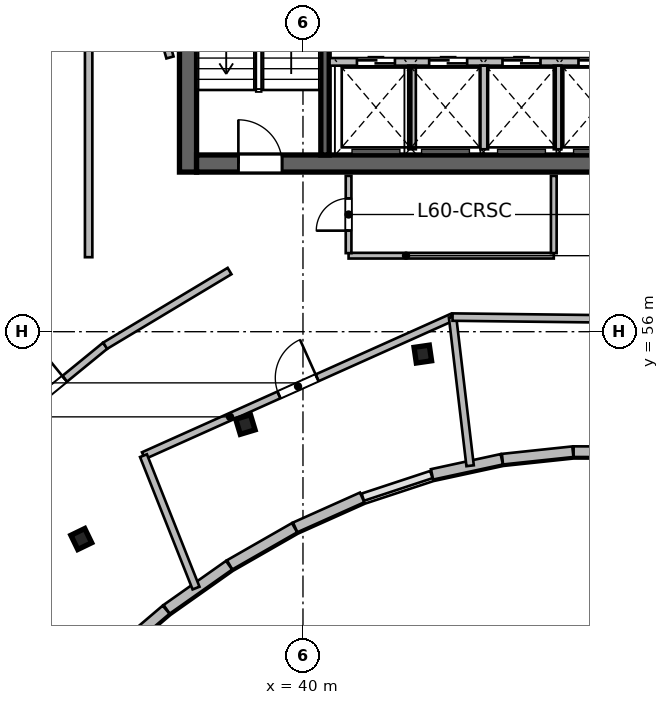
"""IFC4 building model, lengths in metres.
Left out: names, types, materials, properties, quantities, classifications, styles, units other than length and angle.
Written with IfcOpenShell. Run it as: python <this file> out.ifc"""

import sys

from ifc_helpers import new_model, si_unit, direction, frame, frame_2d, origin, origin_2d, place, context, subcontext, project, spatial, rectangle, i_section, extrude, source, transform, mapped, element, fill, save


model = new_model("IFC4")
c1 = context("Model", 3, precision=1e-05, world=origin(), true_north=direction((0.0, 1.0)))
c2 = subcontext(c1, "Body", "Model", "MODEL_VIEW")
j1 = project(units=[si_unit("LENGTHUNIT", "METRE"), si_unit("PLANEANGLEUNIT", "RADIAN")], contexts=[c1])
p1 = place(None, origin())
s1 = spatial("IfcSite", under=j1, at=p1, CompositionType="ELEMENT")
p2 = place(p1, origin())
s2 = spatial("IfcBuilding", under=s1, at=p2, CompositionType="ELEMENT")
p3 = place(p2, frame((0.0, 0.0, 246.9)))
s3 = spatial("IfcBuildingStorey", under=s2, at=p3, CompositionType="ELEMENT", Elevation=246.9)
m1 = source(origin(), c2, "Body", "SweptSolid", [
    extrude(rectangle(XDim=12.0, YDim=0.45, at=frame_2d((6.0, 0.0))), origin(), (0.0, 0.0, 1.0), 3.9),
])
p4 = place(p3, frame((36.975, 60.2, 0.0), z_axis=(0.0, 0.0, 1.0), x_axis=(0.0, 1.0, 0.0)))
e1 = element("IfcWall", 1, at=p4, inside=s3, PredefinedType="SHEAR", context=c2, shape_type="MappedRepresentation", body=[
    mapped(m1, transform((0.0, 0.0, 0.0), scale=1.0)),
])
m2 = source(origin(), c2, "Body", "SweptSolid", [
    extrude(rectangle(XDim=21.6, YDim=0.45, at=frame_2d((10.8, 0.0))), origin(), (0.0, 0.0, 1.0), 3.9),
])
p5 = place(p3, frame((37.2, 60.425, 0.0), z_axis=(0.0, 0.0, 1.0), x_axis=(1.0, 0.0, 0.0)))
e2 = element("IfcWall", 2, at=p5, inside=s3, PredefinedType="SHEAR", context=c2, shape_type="MappedRepresentation", body=[
    mapped(m2, transform((0.0, 0.0, 0.0), scale=1.0)),
])
p6 = place(p5, frame((1.1, 0.0, 0.0)))
e3 = element("IfcOpeningElement", 3, at=p6, cuts=e2, PredefinedType="OPENING", context=c2, shape_type="SweptSolid", body=[
    extrude(rectangle(XDim=1.15, YDim=2.15, at=frame_2d((0.575, 1.075))), frame((0.0, 0.235, 0.0), z_axis=(0.0, -1.0, 0.0), x_axis=(1.0, 0.0, 0.0)), (0.0, 0.0, 1.0), 0.47),
])
p7 = place(p5, frame((19.5, 0.0, 0.0)))
e4 = element("IfcOpeningElement", 4, at=p7, cuts=e2, PredefinedType="OPENING", context=c2, shape_type="SweptSolid", body=[
    extrude(rectangle(XDim=0.9, YDim=2.1, at=frame_2d((0.45, 1.05))), frame((0.0, 0.235, 0.0), z_axis=(0.0, -1.0, 0.0), x_axis=(1.0, 0.0, 0.0)), (0.0, 0.0, 1.0), 0.47),
])
p8 = place(p5, frame((12.02, 0.0, 0.0)))
e5 = element("IfcOpeningElement", 5, at=p8, cuts=e2, PredefinedType="OPENING", context=c2, shape_type="SweptSolid", body=[
    extrude(rectangle(XDim=1.6, YDim=2.15, at=frame_2d((0.8, 1.075))), frame((0.0, 0.235, 0.0), z_axis=(0.0, -1.0, 0.0), x_axis=(1.0, 0.0, 0.0)), (0.0, 0.0, 1.0), 0.47),
])
m3 = source(origin(), c2, "Body", "SweptSolid", [
    extrude(rectangle(XDim=11.1, YDim=0.22, at=frame_2d((5.55, 0.0))), origin(), (0.0, 0.0, 1.0), 3.9),
])
p9 = place(p3, frame((40.58, 60.65, 0.0), z_axis=(0.0, 0.0, 1.0), x_axis=(0.0, 1.0, 0.0)))
e6 = element("IfcWall", 6, at=p9, inside=s3, PredefinedType="SHEAR", context=c2, shape_type="MappedRepresentation", body=[
    mapped(m3, transform((0.0, 0.0, 0.0), scale=1.0)),
])
m4 = source(origin(), c2, "Body", "SweptSolid", [
    extrude(i_section(OverallWidth=0.406, OverallDepth=0.416, WebThickness=0.03, FlangeThickness=0.048, at=origin_2d()), origin(), (0.0, 0.0, 1.0), 3.9),
])
for number, where, z_axis, x_axis in (
    (7, (34.166, 50.545, 0.0), (0.0, 0.0, 1.0), (-0.436, 0.9, 0.0)),
    (8, (38.485, 53.558, 0.0), (0.0, 0.0, 1.0), (-0.289, 0.957, 0.0)),
    (9, (43.154, 55.411, 0.0), (0.0, 0.0, 1.0), (-0.143, 0.99, 0.0)),
):
    element("IfcColumn", number, at=place(p3, frame(where, z_axis=z_axis, x_axis=x_axis)), inside=s3, PredefinedType="COLUMN", context=c2, shape_type="MappedRepresentation", body=[
        mapped(m4, transform((0.0, 0.0, 0.0), scale=1.0)),
    ])
m5 = source(origin(), c2, "Body", "SweptSolid", [
    extrude(rectangle(XDim=1.858, YDim=0.28, at=frame_2d((0.929, 0.0))), origin(), (0.0, 0.0, 1.0), 3.65),
])
p10 = place(p3, frame((48.979, 52.838, 0.0), z_axis=(0.0, 0.0, 1.0), x_axis=(-0.999995433965, 0.003021928128, 0.0)))
e10 = element("IfcWall", 10, at=p10, inside=s3, PredefinedType="SOLIDWALL", context=c2, shape_type="MappedRepresentation", body=[
    mapped(m5, transform((0.0, 0.0, 0.0), scale=1.0)),
])
m6 = source(origin(), c2, "Body", "SweptSolid", [
    extrude(rectangle(XDim=1.862, YDim=0.28, at=frame_2d((0.931, 0.0))), origin(), (0.0, 0.0, 1.0), 3.65),
])
p11 = place(p3, frame((47.102, 52.842, 0.0), z_axis=(0.0, 0.0, 1.0), x_axis=(-0.994430497743, -0.1053944266, 0.0)))
e11 = element("IfcWall", 11, at=p11, inside=s3, PredefinedType="SOLIDWALL", context=c2, shape_type="MappedRepresentation", body=[
    mapped(m6, transform((0.0, 0.0, 0.0), scale=1.0)),
])
m7 = source(origin(), c2, "Body", "SweptSolid", [
    extrude(rectangle(XDim=1.877, YDim=0.28, at=frame_2d((0.938, 0.0))), origin(), (0.0, 0.0, 1.0), 3.65),
])
p12 = place(p3, frame((45.231, 52.643, 0.0), z_axis=(0.0, 0.0, 1.0), x_axis=(-0.97737202312, -0.211527606761, 0.0)))
e12 = element("IfcWall", 12, at=p12, inside=s3, PredefinedType="SOLIDWALL", context=c2, shape_type="MappedRepresentation", body=[
    mapped(m7, transform((0.0, 0.0, 0.0), scale=1.0)),
])
m8 = source(origin(), c2, "Body", "SweptSolid", [
    extrude(rectangle(XDim=1.931, YDim=0.28, at=frame_2d((0.965, 0.0))), origin(), (0.0, 0.0, 1.0), 3.65),
])
p13 = place(p3, frame((41.557, 51.639, 0.0), z_axis=(0.0, 0.0, 1.0), x_axis=(-0.912681759743, -0.408671023481, 0.0)))
e13 = element("IfcWall", 13, at=p13, inside=s3, PredefinedType="SOLIDWALL", context=c2, shape_type="MappedRepresentation", body=[
    mapped(m8, transform((0.0, 0.0, 0.0), scale=1.0)),
])
m9 = source(origin(), c2, "Body", "SweptSolid", [
    extrude(rectangle(XDim=1.969, YDim=0.28, at=frame_2d((0.984, 0.0))), origin(), (0.0, 0.0, 1.0), 3.65),
])
p14 = place(p3, frame((39.779, 50.842, 0.0), z_axis=(0.0, 0.0, 1.0), x_axis=(-0.86797594681, -0.496606238139, 0.0)))
e14 = element("IfcWall", 14, at=p14, inside=s3, PredefinedType="SOLIDWALL", context=c2, shape_type="MappedRepresentation", body=[
    mapped(m9, transform((0.0, 0.0, 0.0), scale=1.0)),
])
m10 = source(origin(), c2, "Body", "SweptSolid", [
    extrude(rectangle(XDim=2.012, YDim=0.28, at=frame_2d((1.006, 0.0))), origin(), (0.0, 0.0, 1.0), 3.65),
])
p15 = place(p3, frame((38.055, 49.855, 0.0), z_axis=(0.0, 0.0, 1.0), x_axis=(-0.817008215805, -0.576626027255, 0.0)))
e15 = element("IfcWall", 15, at=p15, inside=s3, PredefinedType="SOLIDWALL", context=c2, shape_type="MappedRepresentation", body=[
    mapped(m10, transform((0.0, 0.0, 0.0), scale=1.0)),
])
m11 = source(origin(), c2, "Body", "SweptSolid", [
    extrude(rectangle(XDim=2.06, YDim=0.28, at=frame_2d((1.03, 0.0))), origin(), (0.0, 0.0, 1.0), 3.65),
])
p16 = place(p3, frame((36.399, 48.685, 0.0), z_axis=(0.0, 0.0, 1.0), x_axis=(-0.761494573969, -0.648171284319, 0.0)))
e16 = element("IfcWall", 16, at=p16, inside=s3, PredefinedType="SOLIDWALL", context=c2, shape_type="MappedRepresentation", body=[
    mapped(m11, transform((0.0, 0.0, 0.0), scale=1.0)),
])
m12 = source(origin(), c2, "Body", "SweptSolid", [
    extrude(rectangle(XDim=8.02, YDim=0.2, at=frame_2d((4.01, 0.0))), origin(), (0.0, 0.0, 1.0), 3.65),
])
p17 = place(p3, frame((40.7, 63.1, 0.0), z_axis=(0.0, 0.0, 1.0), x_axis=(1.0, 0.0, 0.0)))
e17 = element("IfcWall", 17, at=p17, inside=s3, PredefinedType="SOLIDWALL", context=c2, shape_type="MappedRepresentation", body=[
    mapped(m12, transform((0.0, 0.0, 0.0), scale=1.0)),
])
p18 = place(p17, frame((0.72, 0.0, 0.0)))
e18 = element("IfcOpeningElement", 18, at=p18, cuts=e17, PredefinedType="OPENING", context=c2, shape_type="SweptSolid", body=[
    extrude(rectangle(XDim=1.0, YDim=2.15, at=frame_2d((0.5, 1.075))), frame((0.0, 0.11, 0.0), z_axis=(0.0, -1.0, 0.0), x_axis=(1.0, 0.0, 0.0)), (0.0, 0.0, 1.0), 0.22),
])
p19 = place(p17, frame((2.62, 0.0, 0.0)))
e19 = element("IfcOpeningElement", 19, at=p19, cuts=e17, PredefinedType="OPENING", context=c2, shape_type="SweptSolid", body=[
    extrude(rectangle(XDim=1.0, YDim=2.15, at=frame_2d((0.5, 1.075))), frame((0.0, 0.11, 0.0), z_axis=(0.0, -1.0, 0.0), x_axis=(1.0, 0.0, 0.0)), (0.0, 0.0, 1.0), 0.22),
])
p20 = place(p17, frame((4.55, 0.0, 0.0)))
e20 = element("IfcOpeningElement", 20, at=p20, cuts=e17, PredefinedType="OPENING", context=c2, shape_type="SweptSolid", body=[
    extrude(rectangle(XDim=1.0, YDim=2.15, at=frame_2d((0.5, 1.075))), frame((0.0, 0.11, 0.0), z_axis=(0.0, -1.0, 0.0), x_axis=(1.0, 0.0, 0.0)), (0.0, 0.0, 1.0), 0.22),
])
p21 = place(p17, frame((6.55, 0.0, 0.0)))
e21 = element("IfcOpeningElement", 21, at=p21, cuts=e17, PredefinedType="OPENING", context=c2, shape_type="SweptSolid", body=[
    extrude(rectangle(XDim=1.0, YDim=2.15, at=frame_2d((0.5, 1.075))), frame((0.0, 0.11, 0.0), z_axis=(0.0, -1.0, 0.0), x_axis=(1.0, 0.0, 0.0)), (0.0, 0.0, 1.0), 0.22),
])
m13 = source(origin(), c2, "Body", "SweptSolid", [
    extrude(rectangle(XDim=2.2, YDim=0.2, at=frame_2d((1.1, 0.0))), origin(), (0.0, 0.0, 1.0), 3.65),
])
for number, where, z_axis, x_axis in (
    (22, (42.87, 60.8, 0.0), (0.0, 0.0, 1.0), (0.0, 1.0, 0.0)),
    (23, (44.77, 60.8, 0.0), (0.0, 0.0, 1.0), (0.0, 1.0, 0.0)),
    (24, (46.7, 60.8, 0.0), (0.0, 0.0, 1.0), (0.0, 1.0, 0.0)),
):
    element("IfcWall", number, at=place(p3, frame(where, z_axis=z_axis, x_axis=x_axis)), inside=s3, PredefinedType="SOLIDWALL", context=c2, shape_type="MappedRepresentation", body=[
        mapped(m13, transform((0.0, 0.0, 0.0), scale=1.0)),
    ])
m14 = source(origin(), c2, "Body", "SweptSolid", [
    extrude(rectangle(XDim=5.4, YDim=0.15, at=frame_2d((2.7, 0.0))), origin(), (0.0, 0.0, 1.0), 3.65),
])
p22 = place(p3, frame((41.2, 58.0, 0.0), z_axis=(0.0, 0.0, 1.0), x_axis=(1.0, 0.0, 0.0)))
e25 = element("IfcWall", 25, at=p22, inside=s3, PredefinedType="PARTITIONING", context=c2, shape_type="MappedRepresentation", body=[
    mapped(m14, transform((0.0, 0.0, 0.0), scale=1.0)),
])
m15 = source(origin(), c2, "Body", "SweptSolid", [
    extrude(rectangle(XDim=2.033, YDim=0.15, at=frame_2d((1.016, 0.0))), origin(), (0.0, 0.0, 1.0), 3.65),
])
p23 = place(p3, frame((41.2, 58.067, 0.0), z_axis=(0.0, 0.0, 1.0), x_axis=(0.0, 1.0, 0.0)))
e26 = element("IfcWall", 26, at=p23, inside=s3, PredefinedType="PARTITIONING", context=c2, shape_type="MappedRepresentation", body=[
    mapped(m15, transform((0.0, 0.0, 0.0), scale=1.0)),
])
p24 = place(p23, frame((0.591, 0.0, 0.0)))
e27 = element("IfcOpeningElement", 27, at=p24, cuts=e26, PredefinedType="OPENING", context=c2, shape_type="SweptSolid", body=[
    extrude(rectangle(XDim=0.85, YDim=2.1, at=frame_2d((0.425, 1.05))), frame((0.0, 0.085, 0.0), z_axis=(0.0, -1.0, 0.0), x_axis=(1.0, 0.0, 0.0)), (0.0, 0.0, 1.0), 0.17),
])
p25 = place(p3, frame((46.6, 58.067, 0.0), z_axis=(0.0, 0.0, 1.0), x_axis=(0.0, 1.0, 0.0)))
e28 = element("IfcWall", 28, at=p25, inside=s3, PredefinedType="PARTITIONING", context=c2, shape_type="MappedRepresentation", body=[
    mapped(m15, transform((0.0, 0.0, 0.0), scale=1.0)),
])
m16 = source(origin(), c2, "Body", "SweptSolid", [
    extrude(rectangle(XDim=8.913, YDim=0.195, at=frame_2d((4.457, 0.0))), origin(), (0.0, 0.0, 1.0), 3.65),
])
p26 = place(p3, frame((35.803, 52.738, 0.0), z_axis=(0.0, 0.0, 1.0), x_axis=(0.912488521546, 0.409102307555, 0.0)))
e29 = element("IfcWall", 29, at=p26, inside=s3, PredefinedType="PARTITIONING", context=c2, shape_type="MappedRepresentation", body=[
    mapped(m16, transform((0.0, 0.0, 0.0), scale=1.0)),
])
p27 = place(p26, frame((3.906, 0.0, 0.0)))
e30 = element("IfcOpeningElement", 30, at=p27, cuts=e29, PredefinedType="OPENING", context=c2, shape_type="SweptSolid", body=[
    extrude(rectangle(XDim=1.1, YDim=2.15, at=frame_2d((0.55, 1.075))), frame((0.0, 0.107, 0.0), z_axis=(0.0, -1.0, 0.0), x_axis=(1.0, 0.0, 0.0)), (0.0, 0.0, 1.0), 0.215),
])
m17 = source(origin(), c2, "Body", "SweptSolid", [
    extrude(rectangle(XDim=3.749, YDim=0.195, at=frame_2d((1.875, 0.0))), origin(), (0.0, 0.0, 1.0), 3.65),
])
p28 = place(p3, frame((37.186, 49.254, 0.0), z_axis=(0.0, 0.0, 1.0), x_axis=(-0.368851771682, 0.92948823044, 0.0)))
e31 = element("IfcWall", 31, at=p28, inside=s3, PredefinedType="PARTITIONING", context=c2, shape_type="MappedRepresentation", body=[
    mapped(m17, transform((0.0, 0.0, 0.0), scale=1.0)),
])
m18 = source(origin(), c2, "Body", "SweptSolid", [
    extrude(rectangle(XDim=3.939, YDim=0.195, at=frame_2d((1.969, 0.0))), origin(), (0.0, 0.0, 1.0), 3.65),
])
p29 = place(p3, frame((44.398, 52.473, 0.0), z_axis=(0.0, 0.0, 1.0), x_axis=(-0.117395053494, 0.993085294129, 0.0)))
e32 = element("IfcWall", 32, at=p29, inside=s3, PredefinedType="PARTITIONING", context=c2, shape_type="MappedRepresentation", body=[
    mapped(m18, transform((0.0, 0.0, 0.0), scale=1.0)),
])
m19 = source(origin(), c2, "Body", "SweptSolid", [
    extrude(rectangle(XDim=8.576, YDim=0.195, at=frame_2d((4.288, 0.0))), origin(), (0.0, 0.0, 1.0), 3.65),
])
p30 = place(p3, frame((43.936, 56.385, 0.0), z_axis=(0.0, 0.0, 1.0), x_axis=(0.999931553434, -0.011699933624, 0.0)))
e33 = element("IfcWall", 33, at=p30, inside=s3, PredefinedType="PARTITIONING", context=c2, shape_type="MappedRepresentation", body=[
    mapped(m19, transform((0.0, 0.0, 0.0), scale=1.0)),
])
p31 = place(p30, frame((4.488, 0.0, 0.0)))
e34 = element("IfcOpeningElement", 34, at=p31, cuts=e33, PredefinedType="OPENING", context=c2, shape_type="SweptSolid", body=[
    extrude(rectangle(XDim=1.1, YDim=2.15, at=frame_2d((0.55, 1.075))), frame((0.0, 0.107, 0.0), z_axis=(0.0, -1.0, 0.0), x_axis=(1.0, 0.0, 0.0)), (0.0, 0.0, 1.0), 0.215),
])
m20 = source(origin(), c2, "Body", "SweptSolid", [
    extrude(rectangle(XDim=3.954, YDim=0.195, at=frame_2d((1.977, 0.0))), origin(), (0.0, 0.0, 1.0), 3.65),
])
p32 = place(p3, frame((31.733, 53.13, 0.0), z_axis=(0.0, 0.0, 1.0), x_axis=(0.774345047596, 0.632763579281, 0.0)))
e35 = element("IfcWall", 35, at=p32, inside=s3, PredefinedType="PARTITIONING", context=c2, shape_type="MappedRepresentation", body=[
    mapped(m20, transform((0.0, 0.0, 0.0), scale=1.0)),
])
p33 = place(p32, frame((1.377, 0.0, 0.0)))
e36 = element("IfcOpeningElement", 36, at=p33, cuts=e35, PredefinedType="OPENING", context=c2, shape_type="SweptSolid", body=[
    extrude(rectangle(XDim=1.2, YDim=2.15, at=frame_2d((0.6, 1.075))), frame((0.0, 0.107, 0.0), z_axis=(0.0, -1.0, 0.0), x_axis=(1.0, 0.0, 0.0)), (0.0, 0.0, 1.0), 0.215),
])
m21 = source(origin(), c2, "Body", "SweptSolid", [
    extrude(rectangle(XDim=3.817, YDim=0.195, at=frame_2d((1.909, 0.0))), origin(), (0.0, 0.0, 1.0), 3.65),
])
p34 = place(p3, frame((34.795, 55.632, 0.0), z_axis=(0.0, 0.0, 1.0), x_axis=(0.857453418218, 0.514561595522, 0.0)))
e37 = element("IfcWall", 37, at=p34, inside=s3, PredefinedType="PARTITIONING", context=c2, shape_type="MappedRepresentation", body=[
    mapped(m21, transform((0.0, 0.0, 0.0), scale=1.0)),
])
m22 = source(origin(), c2, "Body", "SweptSolid", [
    extrude(rectangle(XDim=13.169, YDim=0.195, at=frame_2d((6.585, 0.0))), origin(), (0.0, 0.0, 1.0), 3.65),
])
p35 = place(p3, frame((36.5, 63.216, 0.0), z_axis=(0.0, 0.0, 1.0), x_axis=(-0.26875376985, 0.963208913576, 0.0)))
e38 = element("IfcWall", 38, at=p35, inside=s3, PredefinedType="PARTITIONING", context=c2, shape_type="MappedRepresentation", body=[
    mapped(m22, transform((0.0, 0.0, 0.0), scale=1.0)),
])
m23 = source(origin(), c2, "Body", "SweptSolid", [
    extrude(rectangle(XDim=18.567, YDim=0.195, at=frame_2d((9.284, 0.0))), origin(), (0.0, 0.0, 1.0), 3.65),
])
p36 = place(p3, frame((34.36, 57.96, 0.0), z_axis=(0.0, 0.0, 1.0), x_axis=(0.0, 1.0, 0.0)))
e39 = element("IfcWall", 39, at=p36, inside=s3, PredefinedType="PARTITIONING", context=c2, shape_type="MappedRepresentation", body=[
    mapped(m23, transform((0.0, 0.0, 0.0), scale=1.0)),
])
m24 = source(origin(), c2, "Body", "SweptSolid", [
    extrude(rectangle(XDim=1.15, YDim=2.15, at=frame_2d((0.575, 1.075))), frame((0.0, 0.025, 0.0), z_axis=(0.0, -1.0, 0.0), x_axis=(1.0, 0.0, 0.0)), (0.0, 0.0, 1.0), 0.05),
])
p37 = place(p6, origin())
e40 = element("IfcDoor", 40, at=p37, inside=s3, OperationType="SINGLE_SWING_LEFT", PredefinedType="DOOR", context=c2, shape_type="MappedRepresentation", body=[
    mapped(m24, transform((0.0, 0.0, 0.0), scale=1.0)),
])
fill(e3, e40)
m25 = source(origin(), c2, "Body", "SweptSolid", [
    extrude(rectangle(XDim=1.0, YDim=2.15, at=frame_2d((0.5, 1.075))), frame((0.0, 0.025, 0.0), z_axis=(0.0, -1.0, 0.0), x_axis=(1.0, 0.0, 0.0)), (0.0, 0.0, 1.0), 0.05),
])
p38 = place(p18, origin())
e41 = element("IfcDoor", 41, at=p38, inside=s3, OperationType="DOUBLE_DOOR_SLIDING", PredefinedType="DOOR", context=c2, shape_type="MappedRepresentation", body=[
    mapped(m25, transform((0.0, 0.0, 0.0), scale=1.0)),
])
fill(e18, e41)
p39 = place(p19, origin())
e42 = element("IfcDoor", 42, at=p39, inside=s3, OperationType="DOUBLE_DOOR_SLIDING", PredefinedType="DOOR", context=c2, shape_type="MappedRepresentation", body=[
    mapped(m25, transform((0.0, 0.0, 0.0), scale=1.0)),
])
fill(e19, e42)
p40 = place(p20, origin())
e43 = element("IfcDoor", 43, at=p40, inside=s3, OperationType="DOUBLE_DOOR_SLIDING", PredefinedType="DOOR", context=c2, shape_type="MappedRepresentation", body=[
    mapped(m25, transform((0.0, 0.0, 0.0), scale=1.0)),
])
fill(e20, e43)
p41 = place(p21, origin())
e44 = element("IfcDoor", 44, at=p41, inside=s3, OperationType="DOUBLE_DOOR_SLIDING", PredefinedType="DOOR", context=c2, shape_type="MappedRepresentation", body=[
    mapped(m25, transform((0.0, 0.0, 0.0), scale=1.0)),
])
fill(e21, e44)
m26 = source(origin(), c2, "Body", "SweptSolid", [
    extrude(rectangle(XDim=0.85, YDim=2.1, at=frame_2d((0.425, 1.05))), frame((0.0, 0.025, 0.0), z_axis=(0.0, -1.0, 0.0), x_axis=(1.0, 0.0, 0.0)), (0.0, 0.0, 1.0), 0.05),
])
p42 = place(p24, origin())
e45 = element("IfcDoor", 45, at=p42, inside=s3, OperationType="SINGLE_SWING_LEFT", PredefinedType="DOOR", context=c2, shape_type="MappedRepresentation", body=[
    mapped(m26, transform((0.0, 0.0, 0.0), scale=1.0)),
])
fill(e27, e45)
m27 = source(origin(), c2, "Body", "SweptSolid", [
    extrude(rectangle(XDim=1.1, YDim=2.15, at=frame_2d((0.55, 1.075))), frame((0.0, 0.025, 0.0), z_axis=(0.0, -1.0, 0.0), x_axis=(1.0, 0.0, 0.0)), (0.0, 0.0, 1.0), 0.05),
])
p43 = place(p27, origin())
e46 = element("IfcDoor", 46, at=p43, inside=s3, OperationType="SINGLE_SWING_RIGHT", PredefinedType="DOOR", context=c2, shape_type="MappedRepresentation", body=[
    mapped(m27, transform((0.0, 0.0, 0.0), scale=1.0)),
])
fill(e30, e46)
m28 = source(origin(), c2, "Body", "SweptSolid", [
    extrude(rectangle(XDim=1.2, YDim=2.15, at=frame_2d((0.6, 1.075))), frame((0.0, 0.025, 0.0), z_axis=(0.0, -1.0, 0.0), x_axis=(1.0, 0.0, 0.0)), (0.0, 0.0, 1.0), 0.05),
])
p44 = place(p33, origin())
e47 = element("IfcDoor", 47, at=p44, inside=s3, OperationType="SINGLE_SWING_RIGHT", PredefinedType="DOOR", context=c2, shape_type="MappedRepresentation", body=[
    mapped(m28, transform((0.0, 0.0, 0.0), scale=1.0)),
])
fill(e36, e47)
save(model, sys.argv[1])
